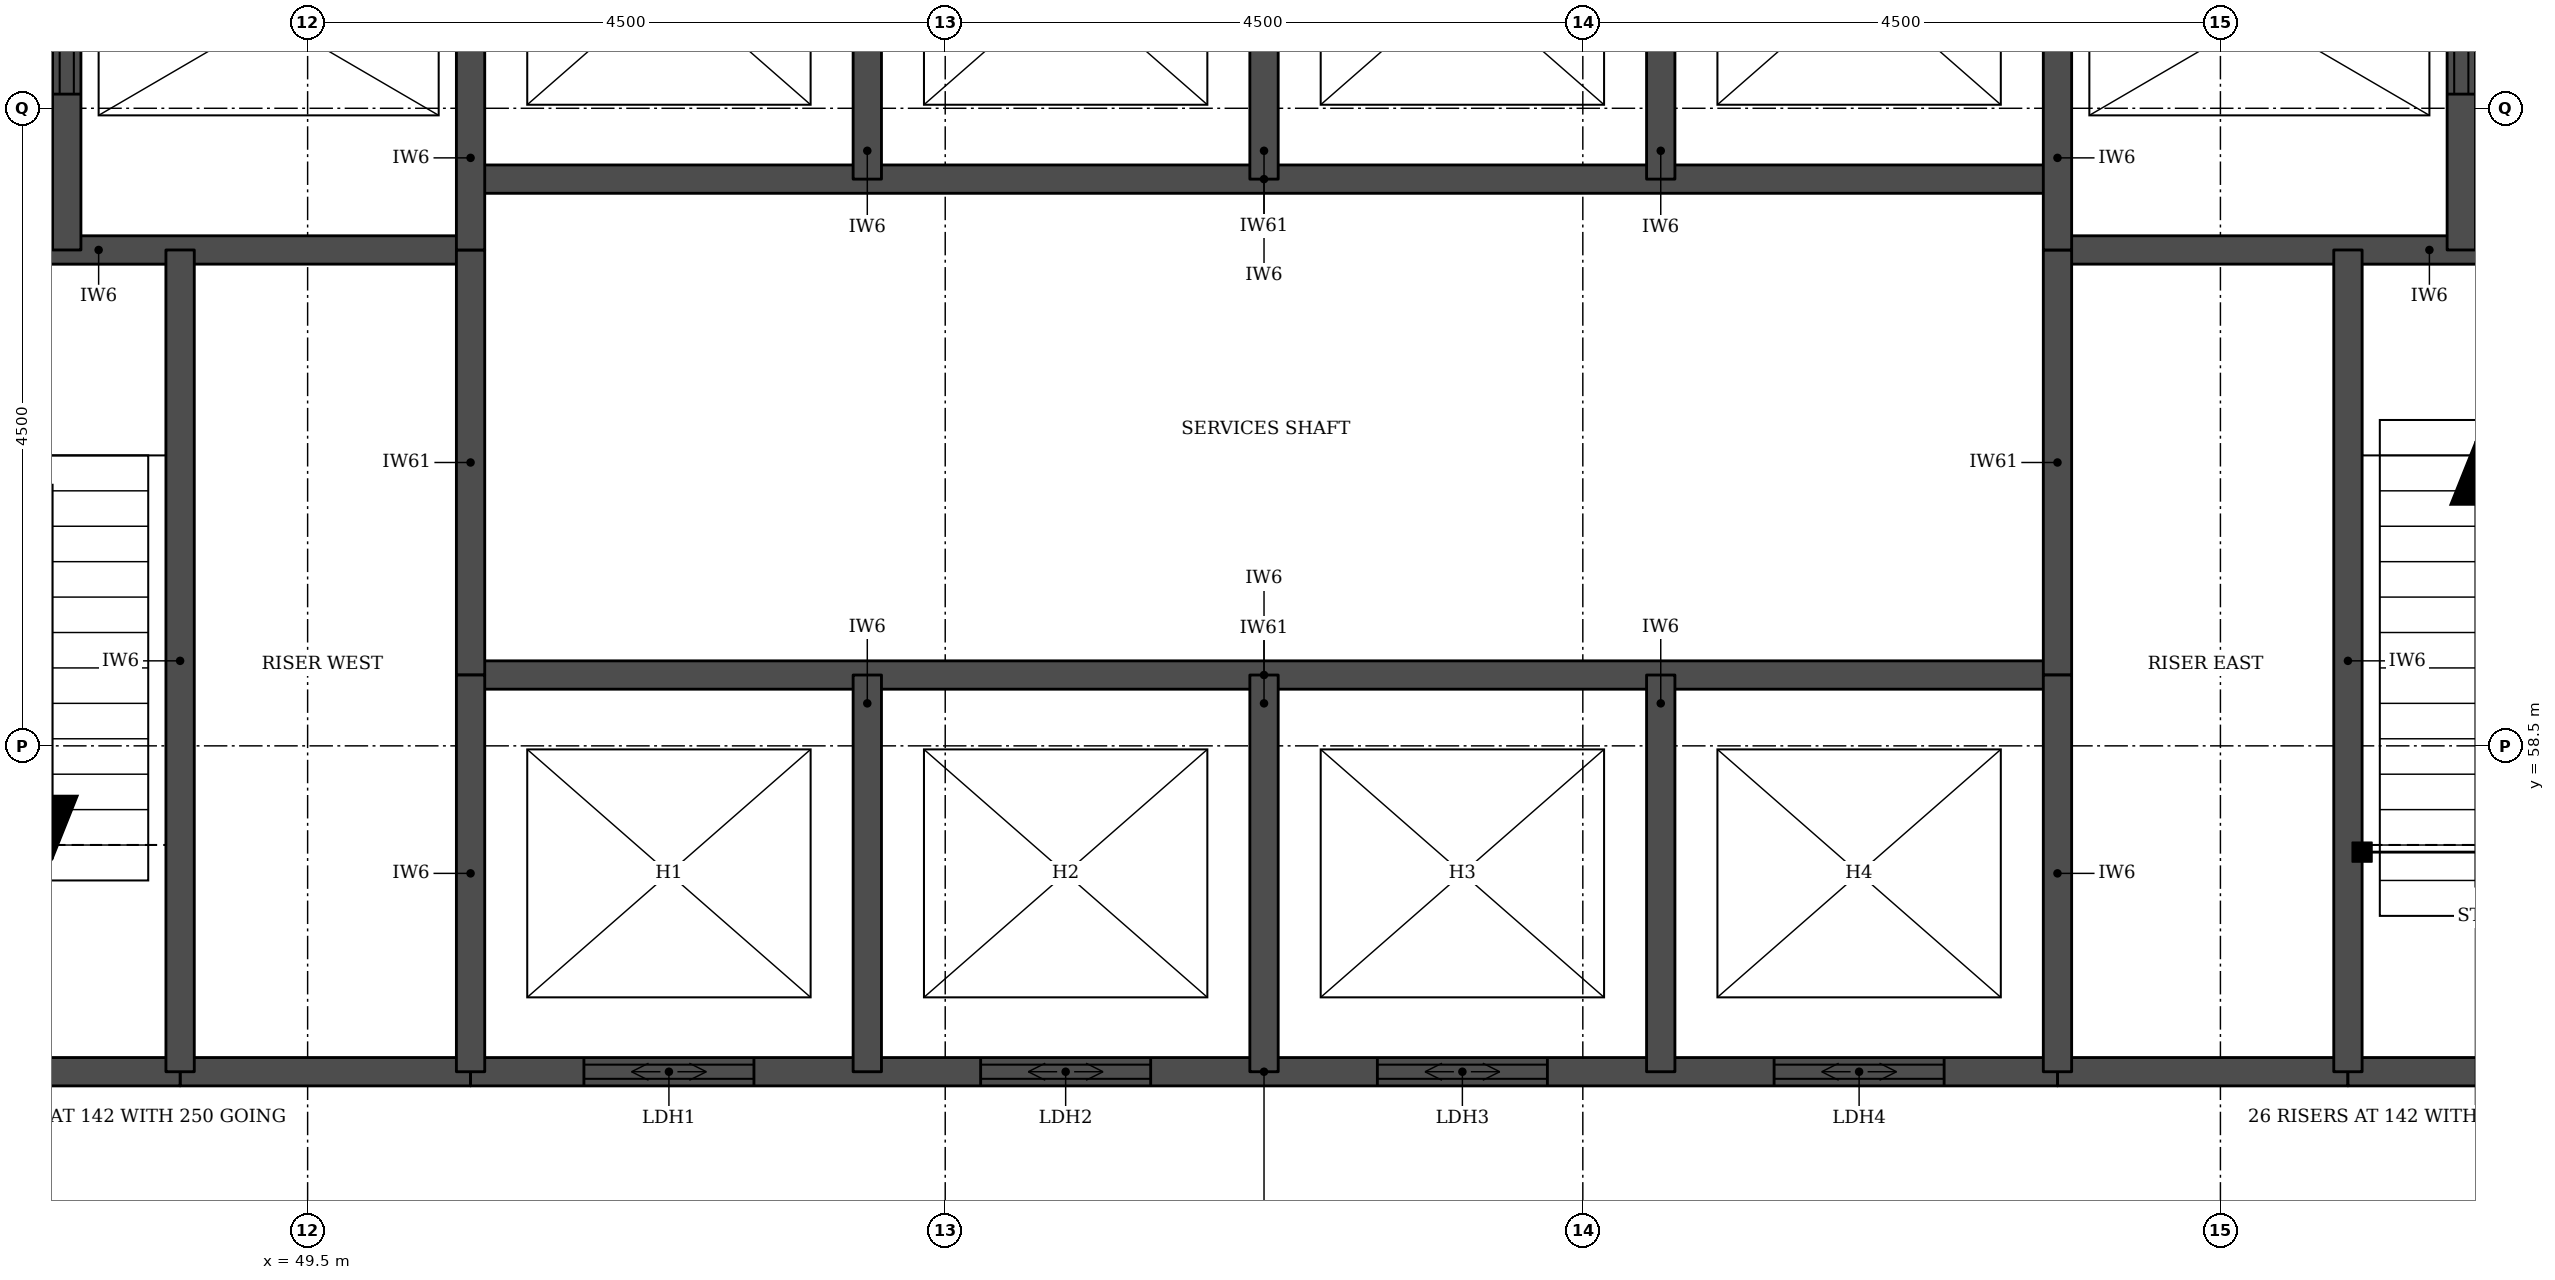
"""IFC4 building model, lengths in metres.
Left out: names, types, materials, properties, quantities, classifications, styles, units other than length and angle.
Written with IfcOpenShell. Run it as: python <this file> out.ifc"""

import sys

from ifc_helpers import new_model, si_unit, direction, frame, frame_2d, origin, place, context, subcontext, project, spatial, rectangle, extrude, element, fill, save


model = new_model("IFC4")
c1 = context("Model", 3, precision=1e-05, world=origin(), true_north=direction((0.0, 1.0)))
c2 = subcontext(c1, "Body", "Model", "MODEL_VIEW")
j1 = project(units=[si_unit("LENGTHUNIT", "METRE"), si_unit("PLANEANGLEUNIT", "RADIAN")], contexts=[c1])
p1 = place(None, origin())
s1 = spatial("IfcSite", under=j1, at=p1, CompositionType="ELEMENT")
p2 = place(p1, origin())
s2 = spatial("IfcBuilding", under=s1, at=p2, CompositionType="ELEMENT")
p3 = place(p2, frame((0.0, 0.0, 234.1)))
s3 = spatial("IfcBuildingStorey", under=s2, at=p3, CompositionType="ELEMENT", Elevation=234.1)
for number, where, z_axis, x_axis in (
    (1, (48.6, 56.2, 0.0), (0.0, 0.0, 1.0), (1.0, 0.0, 0.0)),
    (2, (61.85, 56.2, 0.0), (0.0, 0.0, 1.0), (1.0, 0.0, 0.0)),
):
    element("IfcWall", number, at=place(p3, frame(where, z_axis=z_axis, x_axis=x_axis)), inside=s3, PredefinedType="SOLIDWALL", context=c2, shape_type="SweptSolid", body=[
        extrude(rectangle(XDim=2.05, YDim=0.2, at=frame_2d((1.025, 0.0))), origin(), (0.0, 0.0, 1.0), 3.55),
    ])
p4 = place(p3, frame((45.4, 56.2, 0.0), z_axis=(0.0, 0.0, 1.0), x_axis=(1.0, 0.0, 0.0)))
e3 = element("IfcWall", 3, at=p4, inside=s3, PredefinedType="SOLIDWALL", context=c2, shape_type="SweptSolid", body=[
    extrude(rectangle(XDim=3.2, YDim=0.2, at=frame_2d((1.6, 0.0))), origin(), (0.0, 0.0, 1.0), 3.55),
])
p5 = place(p3, frame((50.65, 56.2, 0.0), z_axis=(0.0, 0.0, 1.0), x_axis=(1.0, 0.0, 0.0)))
e4 = element("IfcWall", 4, at=p5, inside=s3, PredefinedType="SOLIDWALL", context=c2, shape_type="SweptSolid", body=[
    extrude(rectangle(XDim=11.2, YDim=0.2, at=frame_2d((5.6, 0.0))), origin(), (0.0, 0.0, 1.0), 3.55),
])
p6 = place(p5, frame((0.8, 0.0, 0.0)))
e5 = element("IfcOpeningElement", 5, at=p6, cuts=e4, PredefinedType="OPENING", context=c2, shape_type="SweptSolid", body=[
    extrude(rectangle(XDim=1.2, YDim=2.1, at=frame_2d((0.6, 1.05))), frame((0.0, 0.11, 0.0), z_axis=(0.0, -1.0, 0.0), x_axis=(1.0, 0.0, 0.0)), (0.0, 0.0, 1.0), 0.22),
])
p7 = place(p5, frame((3.6, 0.0, 0.0)))
e6 = element("IfcOpeningElement", 6, at=p7, cuts=e4, PredefinedType="OPENING", context=c2, shape_type="SweptSolid", body=[
    extrude(rectangle(XDim=1.2, YDim=2.1, at=frame_2d((0.6, 1.05))), frame((0.0, 0.11, 0.0), z_axis=(0.0, -1.0, 0.0), x_axis=(1.0, 0.0, 0.0)), (0.0, 0.0, 1.0), 0.22),
])
p8 = place(p5, frame((6.4, 0.0, 0.0)))
e7 = element("IfcOpeningElement", 7, at=p8, cuts=e4, PredefinedType="OPENING", context=c2, shape_type="SweptSolid", body=[
    extrude(rectangle(XDim=1.2, YDim=2.1, at=frame_2d((0.6, 1.05))), frame((0.0, 0.11, 0.0), z_axis=(0.0, -1.0, 0.0), x_axis=(1.0, 0.0, 0.0)), (0.0, 0.0, 1.0), 0.22),
])
p9 = place(p5, frame((9.2, 0.0, 0.0)))
e8 = element("IfcOpeningElement", 8, at=p9, cuts=e4, PredefinedType="OPENING", context=c2, shape_type="SweptSolid", body=[
    extrude(rectangle(XDim=1.2, YDim=2.1, at=frame_2d((0.6, 1.05))), frame((0.0, 0.11, 0.0), z_axis=(0.0, -1.0, 0.0), x_axis=(1.0, 0.0, 0.0)), (0.0, 0.0, 1.0), 0.22),
])
p10 = place(p3, frame((63.9, 56.2, 0.0), z_axis=(0.0, 0.0, 1.0), x_axis=(1.0, 0.0, 0.0)))
e9 = element("IfcWall", 9, at=p10, inside=s3, PredefinedType="SOLIDWALL", context=c2, shape_type="SweptSolid", body=[
    extrude(rectangle(XDim=3.2, YDim=0.2, at=frame_2d((1.6, 0.0))), origin(), (0.0, 0.0, 1.0), 3.55),
])
p11 = place(p3, frame((50.65, 59.0, 0.0), z_axis=(0.0, 0.0, 1.0), x_axis=(1.0, 0.0, 0.0)))
e10 = element("IfcWall", 10, at=p11, inside=s3, PredefinedType="SOLIDWALL", context=c2, shape_type="SweptSolid", body=[
    extrude(rectangle(XDim=11.2, YDim=0.2, at=frame_2d((5.6, 0.0))), origin(), (0.0, 0.0, 1.0), 3.7),
])
for number, where, z_axis, x_axis in (
    (11, (45.4, 62.0, 0.0), (0.0, 0.0, 1.0), (1.0, 0.0, 0.0)),
    (12, (61.85, 62.0, 0.0), (0.0, 0.0, 1.0), (1.0, 0.0, 0.0)),
):
    element("IfcWall", number, at=place(p3, frame(where, z_axis=z_axis, x_axis=x_axis)), inside=s3, PredefinedType="SOLIDWALL", context=c2, shape_type="SweptSolid", body=[
        extrude(rectangle(XDim=5.25, YDim=0.2, at=frame_2d((2.625, 0.0))), origin(), (0.0, 0.0, 1.0), 3.55),
    ])
p12 = place(p3, frame((50.65, 62.5, 0.0), z_axis=(0.0, 0.0, 1.0), x_axis=(1.0, 0.0, 0.0)))
e13 = element("IfcWall", 13, at=p12, inside=s3, PredefinedType="SOLIDWALL", context=c2, shape_type="SweptSolid", body=[
    extrude(rectangle(XDim=11.2, YDim=0.2, at=frame_2d((5.6, 0.0))), origin(), (0.0, 0.0, 1.0), 3.7),
])
p13 = place(p3, frame((47.8, 62.0, 0.0), z_axis=(0.0, 0.0, 1.0), x_axis=(0.0, 1.0, 0.0)))
e14 = element("IfcWall", 14, at=p13, inside=s3, PredefinedType="SOLIDWALL", context=c2, shape_type="SweptSolid", body=[
    extrude(rectangle(XDim=3.3, YDim=0.2, at=frame_2d((1.65, 0.0))), origin(), (0.0, 0.0, 1.0), 3.55),
])
p14 = place(p13, frame((1.1, 0.0, 0.0)))
e15 = element("IfcOpeningElement", 15, at=p14, cuts=e14, PredefinedType="OPENING", context=c2, shape_type="SweptSolid", body=[
    extrude(rectangle(XDim=1.1, YDim=2.1, at=frame_2d((0.55, 1.05))), frame((0.0, 0.11, 0.0), z_axis=(0.0, -1.0, 0.0), x_axis=(1.0, 0.0, 0.0)), (0.0, 0.0, 1.0), 0.22),
])
p15 = place(p3, frame((48.6, 56.2, 0.0), z_axis=(0.0, 0.0, 1.0), x_axis=(0.0, 1.0, 0.0)))
e16 = element("IfcWall", 16, at=p15, inside=s3, PredefinedType="SOLIDWALL", context=c2, shape_type="SweptSolid", body=[
    extrude(rectangle(XDim=5.8, YDim=0.2, at=frame_2d((2.9, 0.0))), origin(), (0.0, 0.0, 1.0), 3.55),
])
p16 = place(p3, frame((50.65, 59.0, 0.0), z_axis=(0.0, 0.0, 1.0), x_axis=(0.0, 1.0, 0.0)))
e17 = element("IfcWall", 17, at=p16, inside=s3, PredefinedType="SOLIDWALL", context=c2, shape_type="SweptSolid", body=[
    extrude(rectangle(XDim=3.0, YDim=0.2, at=frame_2d((1.5, 0.0))), origin(), (0.0, 0.0, 1.0), 3.7),
])
p17 = place(p3, frame((50.65, 56.2, 0.0), z_axis=(0.0, 0.0, 1.0), x_axis=(0.0, 1.0, 0.0)))
e18 = element("IfcWall", 18, at=p17, inside=s3, PredefinedType="SOLIDWALL", context=c2, shape_type="SweptSolid", body=[
    extrude(rectangle(XDim=2.8, YDim=0.2, at=frame_2d((1.4, 0.0))), origin(), (0.0, 0.0, 1.0), 3.55),
])
p18 = place(p3, frame((50.65, 62.0, 0.0), z_axis=(0.0, 0.0, 1.0), x_axis=(0.0, 1.0, 0.0)))
e19 = element("IfcWall", 19, at=p18, inside=s3, PredefinedType="SOLIDWALL", context=c2, shape_type="SweptSolid", body=[
    extrude(rectangle(XDim=3.3, YDim=0.2, at=frame_2d((1.65, 0.0))), origin(), (0.0, 0.0, 1.0), 3.55),
])
for number, where, z_axis, x_axis in (
    (20, (53.45, 56.2, 0.0), (0.0, 0.0, 1.0), (0.0, 1.0, 0.0)),
    (21, (53.45, 62.5, 0.0), (0.0, 0.0, 1.0), (0.0, 1.0, 0.0)),
    (22, (56.25, 56.2, 0.0), (0.0, 0.0, 1.0), (0.0, 1.0, 0.0)),
    (23, (56.25, 62.5, 0.0), (0.0, 0.0, 1.0), (0.0, 1.0, 0.0)),
    (24, (59.05, 56.2, 0.0), (0.0, 0.0, 1.0), (0.0, 1.0, 0.0)),
    (25, (59.05, 62.5, 0.0), (0.0, 0.0, 1.0), (0.0, 1.0, 0.0)),
):
    element("IfcWall", number, at=place(p3, frame(where, z_axis=z_axis, x_axis=x_axis)), inside=s3, PredefinedType="SOLIDWALL", context=c2, shape_type="SweptSolid", body=[
        extrude(rectangle(XDim=2.8, YDim=0.2, at=frame_2d((1.4, 0.0))), origin(), (0.0, 0.0, 1.0), 3.55),
    ])
p19 = place(p3, frame((61.85, 59.0, 0.0), z_axis=(0.0, 0.0, 1.0), x_axis=(0.0, 1.0, 0.0)))
e26 = element("IfcWall", 26, at=p19, inside=s3, PredefinedType="SOLIDWALL", context=c2, shape_type="SweptSolid", body=[
    extrude(rectangle(XDim=3.0, YDim=0.2, at=frame_2d((1.5, 0.0))), origin(), (0.0, 0.0, 1.0), 3.7),
])
p20 = place(p3, frame((61.85, 56.2, 0.0), z_axis=(0.0, 0.0, 1.0), x_axis=(0.0, 1.0, 0.0)))
e27 = element("IfcWall", 27, at=p20, inside=s3, PredefinedType="SOLIDWALL", context=c2, shape_type="SweptSolid", body=[
    extrude(rectangle(XDim=2.8, YDim=0.2, at=frame_2d((1.4, 0.0))), origin(), (0.0, 0.0, 1.0), 3.55),
])
p21 = place(p3, frame((61.85, 62.0, 0.0), z_axis=(0.0, 0.0, 1.0), x_axis=(0.0, 1.0, 0.0)))
e28 = element("IfcWall", 28, at=p21, inside=s3, PredefinedType="SOLIDWALL", context=c2, shape_type="SweptSolid", body=[
    extrude(rectangle(XDim=3.3, YDim=0.2, at=frame_2d((1.65, 0.0))), origin(), (0.0, 0.0, 1.0), 3.55),
])
p22 = place(p3, frame((63.9, 56.2, 0.0), z_axis=(0.0, 0.0, 1.0), x_axis=(0.0, 1.0, 0.0)))
e29 = element("IfcWall", 29, at=p22, inside=s3, PredefinedType="SOLIDWALL", context=c2, shape_type="SweptSolid", body=[
    extrude(rectangle(XDim=5.8, YDim=0.2, at=frame_2d((2.9, 0.0))), origin(), (0.0, 0.0, 1.0), 3.55),
])
p23 = place(p3, frame((64.7, 62.0, 0.0), z_axis=(0.0, 0.0, 1.0), x_axis=(0.0, 1.0, 0.0)))
e30 = element("IfcWall", 30, at=p23, inside=s3, PredefinedType="SOLIDWALL", context=c2, shape_type="SweptSolid", body=[
    extrude(rectangle(XDim=3.3, YDim=0.2, at=frame_2d((1.65, 0.0))), origin(), (0.0, 0.0, 1.0), 3.55),
])
p24 = place(p23, frame((1.1, 0.0, 0.0)))
e31 = element("IfcOpeningElement", 31, at=p24, cuts=e30, PredefinedType="OPENING", context=c2, shape_type="SweptSolid", body=[
    extrude(rectangle(XDim=1.1, YDim=2.1, at=frame_2d((0.55, 1.05))), frame((0.0, 0.11, 0.0), z_axis=(0.0, -1.0, 0.0), x_axis=(1.0, 0.0, 0.0)), (0.0, 0.0, 1.0), 0.22),
])
p25 = place(p6, origin())
e32 = element("IfcDoor", 32, at=p25, inside=s3, OperationType="DOUBLE_DOOR_SLIDING", PredefinedType="DOOR", context=c2, shape_type="SweptSolid", body=[
    extrude(rectangle(XDim=1.2, YDim=2.1, at=frame_2d((0.6, 1.05))), frame((0.0, 0.025, 0.0), z_axis=(0.0, -1.0, 0.0), x_axis=(1.0, 0.0, 0.0)), (0.0, 0.0, 1.0), 0.05),
])
fill(e5, e32)
p26 = place(p7, origin())
e33 = element("IfcDoor", 33, at=p26, inside=s3, OperationType="DOUBLE_DOOR_SLIDING", PredefinedType="DOOR", context=c2, shape_type="SweptSolid", body=[
    extrude(rectangle(XDim=1.2, YDim=2.1, at=frame_2d((0.6, 1.05))), frame((0.0, 0.025, 0.0), z_axis=(0.0, -1.0, 0.0), x_axis=(1.0, 0.0, 0.0)), (0.0, 0.0, 1.0), 0.05),
])
fill(e6, e33)
p27 = place(p8, origin())
e34 = element("IfcDoor", 34, at=p27, inside=s3, OperationType="DOUBLE_DOOR_SLIDING", PredefinedType="DOOR", context=c2, shape_type="SweptSolid", body=[
    extrude(rectangle(XDim=1.2, YDim=2.1, at=frame_2d((0.6, 1.05))), frame((0.0, 0.025, 0.0), z_axis=(0.0, -1.0, 0.0), x_axis=(1.0, 0.0, 0.0)), (0.0, 0.0, 1.0), 0.05),
])
fill(e7, e34)
p28 = place(p9, origin())
e35 = element("IfcDoor", 35, at=p28, inside=s3, OperationType="DOUBLE_DOOR_SLIDING", PredefinedType="DOOR", context=c2, shape_type="SweptSolid", body=[
    extrude(rectangle(XDim=1.2, YDim=2.1, at=frame_2d((0.6, 1.05))), frame((0.0, 0.025, 0.0), z_axis=(0.0, -1.0, 0.0), x_axis=(1.0, 0.0, 0.0)), (0.0, 0.0, 1.0), 0.05),
])
fill(e8, e35)
p29 = place(p14, origin())
e36 = element("IfcDoor", 36, at=p29, inside=s3, OperationType="DOUBLE_DOOR_SLIDING", PredefinedType="DOOR", context=c2, shape_type="SweptSolid", body=[
    extrude(rectangle(XDim=1.1, YDim=2.1, at=frame_2d((0.55, 1.05))), frame((0.0, 0.025, 0.0), z_axis=(0.0, -1.0, 0.0), x_axis=(1.0, 0.0, 0.0)), (0.0, 0.0, 1.0), 0.05),
])
fill(e15, e36)
p30 = place(p24, origin())
e37 = element("IfcDoor", 37, at=p30, inside=s3, OperationType="DOUBLE_DOOR_SLIDING", PredefinedType="DOOR", context=c2, shape_type="SweptSolid", body=[
    extrude(rectangle(XDim=1.1, YDim=2.1, at=frame_2d((0.55, 1.05))), frame((0.0, 0.025, 0.0), z_axis=(0.0, -1.0, 0.0), x_axis=(1.0, 0.0, 0.0)), (0.0, 0.0, 1.0), 0.05),
])
fill(e31, e37)
save(model, sys.argv[1])
